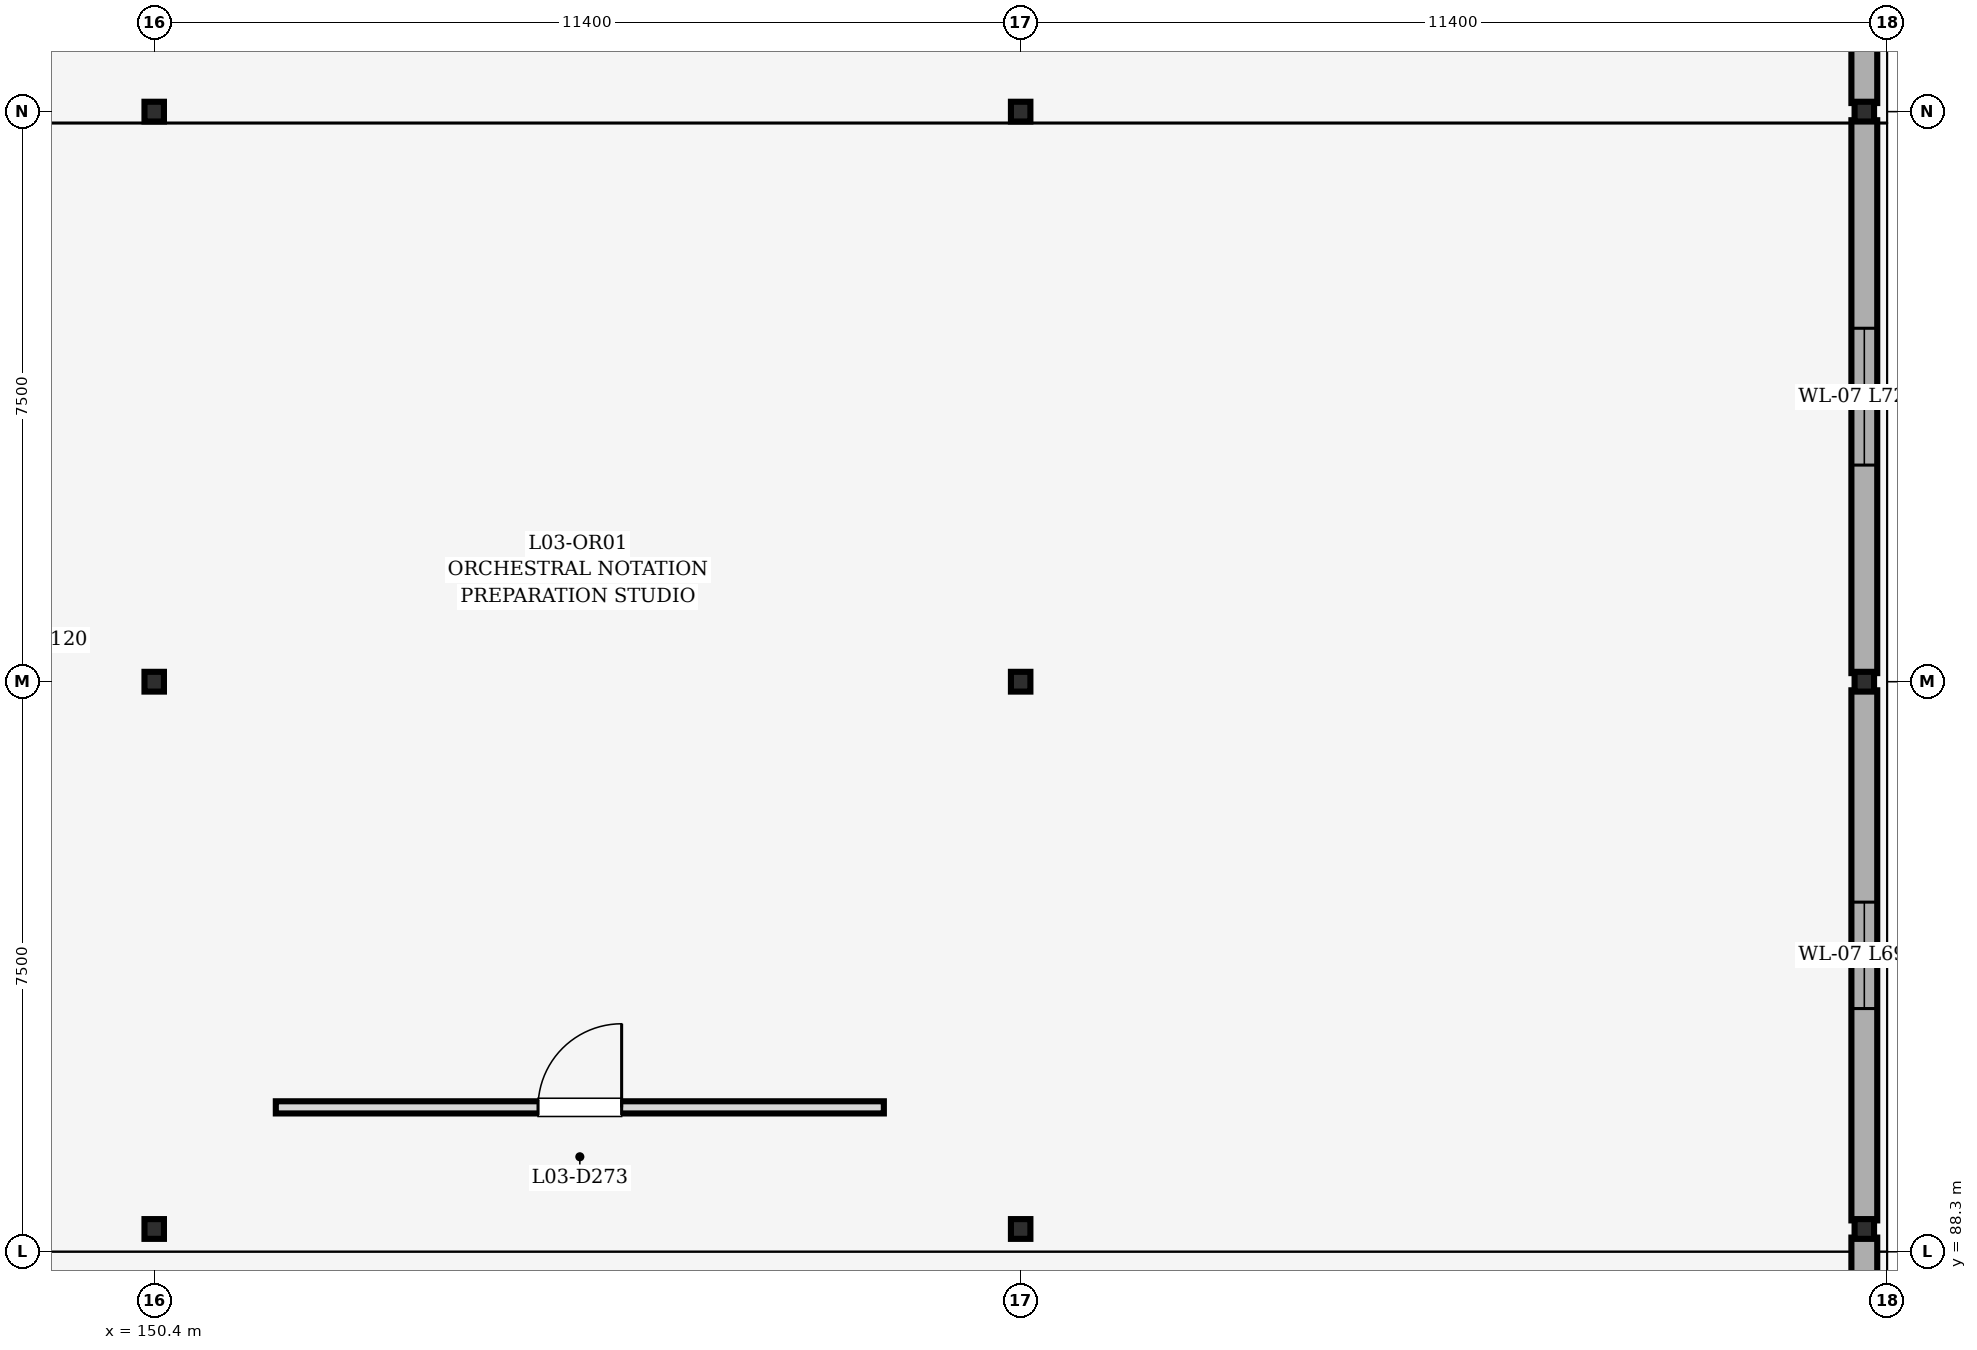
"""IFC4 building model, lengths in metres.
Left out: names, types, materials, properties, quantities, classifications, styles, units other than length and angle.
Written with IfcOpenShell. Run it as: python <this file> out.ifc"""

import sys

from ifc_helpers import new_model, si_unit, direction, frame, frame_2d, origin, origin_2d, place, context, subcontext, project, spatial, rectangle, i_section, extrude, element, fill, save


model = new_model("IFC4")
c1 = context("Model", 3, precision=1e-05, world=origin(), true_north=direction((0.0, 1.0)))
c2 = subcontext(c1, "Body", "Model", "MODEL_VIEW")
j1 = project(units=[si_unit("LENGTHUNIT", "METRE"), si_unit("PLANEANGLEUNIT", "RADIAN")], contexts=[c1])
p1 = place(None, origin())
s1 = spatial("IfcSite", under=j1, at=p1, CompositionType="ELEMENT")
p2 = place(p1, origin())
s2 = spatial("IfcBuilding", under=s1, at=p2, CompositionType="ELEMENT")
p3 = place(p2, frame((0.0, 0.0, 10.2)))
s3 = spatial("IfcBuildingStorey", under=s2, at=p3, CompositionType="ELEMENT", Elevation=10.2)
for number, where, z_axis, x_axis in (
    (1, (150.4, 88.6, 0.0), (0.0, 0.0, 1.0), (1.0, 0.0, 0.0)),
    (2, (150.4, 95.8, 0.0), (0.0, 0.0, 1.0), (1.0, 0.0, 0.0)),
    (3, (150.4, 103.3, 0.0), (0.0, 0.0, 1.0), (1.0, 0.0, 0.0)),
    (4, (161.8, 88.6, 0.0), (0.0, 0.0, 1.0), (1.0, 0.0, 0.0)),
    (5, (161.8, 95.8, 0.0), (0.0, 0.0, 1.0), (1.0, 0.0, 0.0)),
    (6, (161.8, 103.3, 0.0), (0.0, 0.0, 1.0), (1.0, 0.0, 0.0)),
    (7, (172.9, 88.6, 0.0), (0.0, 0.0, 1.0), (1.0, 0.0, 0.0)),
    (8, (172.9, 95.8, 0.0), (0.0, 0.0, 1.0), (1.0, 0.0, 0.0)),
    (9, (172.9, 103.3, 0.0), (0.0, 0.0, 1.0), (1.0, 0.0, 0.0)),
):
    element("IfcColumn", number, at=place(p3, frame(where, z_axis=z_axis, x_axis=x_axis)), inside=s3, PredefinedType="COLUMN", context=c2, shape_type="SweptSolid", body=[
        extrude(i_section(OverallWidth=0.256, OverallDepth=0.26, WebThickness=0.01, FlangeThickness=0.017, at=origin_2d()), origin(), (0.0, 0.0, 1.0), 4.5),
    ])
p4 = place(p3, frame((172.9, 95.687, 0.0), z_axis=(0.0, 0.0, 1.0), x_axis=(0.0, -1.0, 0.0)))
e10 = element("IfcWall", 10, at=p4, inside=s3, PredefinedType="STANDARD", context=c2, shape_type="SweptSolid", body=[
    extrude(rectangle(XDim=6.974, YDim=0.34, at=frame_2d((3.487, 0.0))), origin(), (0.0, 0.0, 1.0), 3.517),
])
p5 = place(p4, frame((2.787, 0.0, 0.85)))
e11 = element("IfcOpeningElement", 11, at=p5, cuts=e10, PredefinedType="OPENING", context=c2, shape_type="SweptSolid", body=[
    extrude(rectangle(XDim=1.4, YDim=2.2, at=frame_2d((0.7, 1.1))), frame((0.0, 0.182, 0.0), z_axis=(0.0, -1.0, 0.0), x_axis=(1.0, 0.0, 0.0)), (0.0, 0.0, 1.0), 0.364),
])
p6 = place(p3, frame((172.9, 103.187, 0.0), z_axis=(0.0, 0.0, 1.0), x_axis=(0.0, -1.0, 0.0)))
e12 = element("IfcWall", 12, at=p6, inside=s3, PredefinedType="STANDARD", context=c2, shape_type="SweptSolid", body=[
    extrude(rectangle(XDim=7.274, YDim=0.34, at=frame_2d((3.637, 0.0))), origin(), (0.0, 0.0, 1.0), 3.517),
])
p7 = place(p6, frame((2.737, 0.0, 0.85)))
e13 = element("IfcOpeningElement", 13, at=p7, cuts=e12, PredefinedType="OPENING", context=c2, shape_type="SweptSolid", body=[
    extrude(rectangle(XDim=1.8, YDim=2.2, at=frame_2d((0.9, 1.1))), frame((0.0, 0.182, 0.0), z_axis=(0.0, -1.0, 0.0), x_axis=(1.0, 0.0, 0.0)), (0.0, 0.0, 1.0), 0.364),
])
p8 = place(p3, frame((172.9, 110.387, 0.0), z_axis=(0.0, 0.0, 1.0), x_axis=(0.0, -1.0, 0.0)))
e14 = element("IfcWall", 14, at=p8, inside=s3, PredefinedType="STANDARD", context=c2, shape_type="SweptSolid", body=[
    extrude(rectangle(XDim=6.974, YDim=0.34, at=frame_2d((3.487, 0.0))), origin(), (0.0, 0.0, 1.0), 3.615),
])
p9 = place(p8, frame((2.962, 0.0, 0.85)))
e15 = element("IfcOpeningElement", 15, at=p9, cuts=e14, PredefinedType="OPENING", context=c2, shape_type="SweptSolid", body=[
    extrude(rectangle(XDim=1.05, YDim=1.95, at=frame_2d((0.525, 0.975))), frame((0.0, 0.182, 0.0), z_axis=(0.0, -1.0, 0.0), x_axis=(1.0, 0.0, 0.0)), (0.0, 0.0, 1.0), 0.364),
])
p10 = place(p3, frame((172.9, 88.487, 0.0), z_axis=(0.0, 0.0, 1.0), x_axis=(0.0, -1.0, 0.0)))
e16 = element("IfcWall", 16, at=p10, inside=s3, PredefinedType="STANDARD", context=c2, shape_type="SweptSolid", body=[
    extrude(rectangle(XDim=7.575, YDim=0.34, at=frame_2d((3.788, 0.0))), origin(), (0.0, 0.0, 1.0), 3.517),
])
p11 = place(p10, frame((3.097, 0.0, 0.85)))
e17 = element("IfcOpeningElement", 17, at=p11, cuts=e16, PredefinedType="OPENING", context=c2, shape_type="SweptSolid", body=[
    extrude(rectangle(XDim=1.38, YDim=1.75, at=frame_2d((0.69, 0.875))), frame((0.0, 0.182, 0.0), z_axis=(0.0, -1.0, 0.0), x_axis=(1.0, 0.0, 0.0)), (0.0, 0.0, 1.0), 0.364),
])
p12 = place(p3, frame((152.0, 90.2, 0.0), z_axis=(0.0, 0.0, 1.0), x_axis=(1.0, 0.0, 0.0)))
e18 = element("IfcWall", 18, at=p12, inside=s3, PredefinedType="PARTITIONING", context=c2, shape_type="SweptSolid", body=[
    extrude(rectangle(XDim=8.0, YDim=0.16, at=frame_2d((4.0, 0.0))), origin(), (0.0, 0.0, 1.0), 4.215),
])
p13 = place(p12, frame((3.45, 0.0, 0.0)))
e19 = element("IfcOpeningElement", 19, at=p13, cuts=e18, PredefinedType="OPENING", context=c2, shape_type="SweptSolid", body=[
    extrude(rectangle(XDim=1.1, YDim=2.2, at=frame_2d((0.55, 1.1))), frame((0.0, 0.092, 0.0), z_axis=(0.0, -1.0, 0.0), x_axis=(1.0, 0.0, 0.0)), (0.0, 0.0, 1.0), 0.184),
])
p14 = place(p5, origin())
e20 = element("IfcWindow", 20, at=p14, inside=s3, PartitioningType="DOUBLE_PANEL_VERTICAL", PredefinedType="WINDOW", context=c2, shape_type="SweptSolid", body=[
    extrude(rectangle(XDim=1.4, YDim=2.2, at=frame_2d((0.7, 1.1))), frame((0.0, 0.03, 0.0), z_axis=(0.0, -1.0, 0.0), x_axis=(1.0, 0.0, 0.0)), (0.0, 0.0, 1.0), 0.06),
])
fill(e11, e20)
p15 = place(p7, origin())
e21 = element("IfcWindow", 21, at=p15, inside=s3, PartitioningType="DOUBLE_PANEL_VERTICAL", PredefinedType="WINDOW", context=c2, shape_type="SweptSolid", body=[
    extrude(rectangle(XDim=1.8, YDim=2.2, at=frame_2d((0.9, 1.1))), frame((0.0, 0.03, 0.0), z_axis=(0.0, -1.0, 0.0), x_axis=(1.0, 0.0, 0.0)), (0.0, 0.0, 1.0), 0.06),
])
fill(e13, e21)
p16 = place(p13, origin())
e22 = element("IfcDoor", 22, at=p16, inside=s3, OperationType="SINGLE_SWING_RIGHT", PredefinedType="DOOR", context=c2, shape_type="SweptSolid", body=[
    extrude(rectangle(XDim=1.1, YDim=2.2, at=frame_2d((0.55, 1.1))), frame((0.0, 0.025, 0.0), z_axis=(0.0, -1.0, 0.0), x_axis=(1.0, 0.0, 0.0)), (0.0, 0.0, 1.0), 0.05),
])
fill(e19, e22)
save(model, sys.argv[1])
